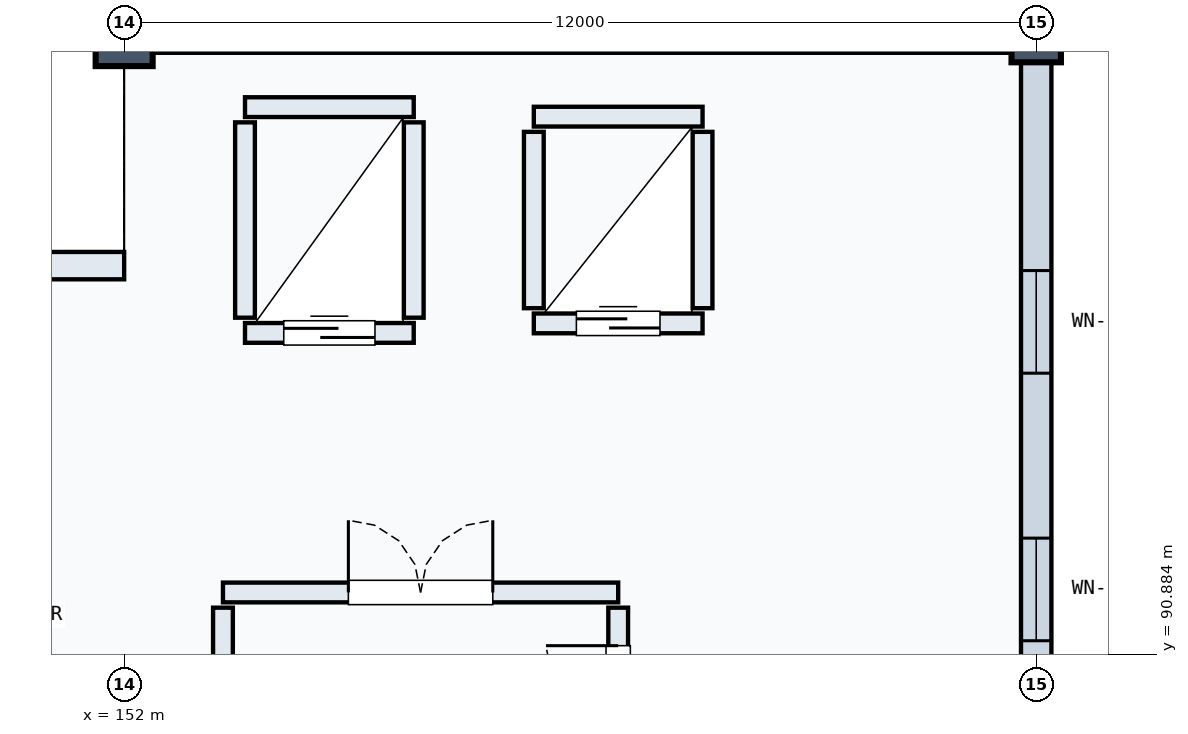
"""IFC4 building model, lengths in metres.
Left out: names, types, materials, properties, quantities, classifications, styles, units other than length and angle.
Written with IfcOpenShell. Run it as: python <this file> out.ifc"""

import sys

from ifc_helpers import new_model, si_unit, direction, frame, frame_2d, origin, origin_2d, place, context, subcontext, project, spatial, rectangle, circle, extrude, element, fill, save


model = new_model("IFC4")
c1 = context("Model", 3, precision=1e-05, world=origin(), true_north=direction((0.0, 1.0)))
c2 = subcontext(c1, "Body", "Model", "MODEL_VIEW")
j1 = project(units=[si_unit("LENGTHUNIT", "METRE"), si_unit("PLANEANGLEUNIT", "RADIAN")], contexts=[c1])
p1 = place(None, origin())
s1 = spatial("IfcSite", under=j1, at=p1, CompositionType="ELEMENT")
p2 = place(p1, origin())
s2 = spatial("IfcBuilding", under=s1, at=p2, CompositionType="ELEMENT")
p3 = place(p2, frame((0.0, 0.0, 19.5)))
s3 = spatial("IfcBuildingStorey", under=s2, at=p3, CompositionType="ELEMENT", Elevation=19.5)
p4 = place(p3, frame((152.0, 99.0, 0.0), z_axis=(0.0, 0.0, 1.0), x_axis=(1.0, 0.0, 0.0)))
e1 = element("IfcColumn", 1, at=p4, inside=s3, PredefinedType="COLUMN", context=c2, shape_type="SweptSolid", body=[
    extrude(circle(Radius=0.375, at=origin_2d()), origin(), (0.0, 0.0, 1.0), 4.8),
])
p5 = place(p3, frame((164.0, 99.0, 0.0), z_axis=(0.0, 0.0, 1.0), x_axis=(1.0, 0.0, 0.0)))
e2 = element("IfcColumn", 2, at=p5, inside=s3, PredefinedType="COLUMN", context=c2, shape_type="SweptSolid", body=[
    extrude(circle(Radius=0.325, at=origin_2d()), origin(), (0.0, 0.0, 1.0), 4.8),
])
p6 = place(p3, frame((140.0, 96.0, 0.0), z_axis=(0.0, 0.0, 1.0), x_axis=(1.0, 0.0, 0.0)))
e3 = element("IfcWall", 3, at=p6, inside=s3, PredefinedType="SOLIDWALL", context=c2, shape_type="SweptSolid", body=[
    extrude(rectangle(XDim=12.0, YDim=0.36, at=frame_2d((6.0, 0.0))), origin(), (0.0, 0.0, 1.0), 3.69),
])
p7 = place(p6, frame((2.1, 0.0, 0.85)))
e4 = element("IfcOpeningElement", 4, at=p7, cuts=e3, PredefinedType="OPENING", context=c2, shape_type="SweptSolid", body=[
    extrude(rectangle(XDim=1.8, YDim=2.1, at=frame_2d((0.9, 1.05))), frame((0.0, 0.19, 0.0), z_axis=(0.0, -1.0, 0.0), x_axis=(1.0, 0.0, 0.0)), (0.0, 0.0, 1.0), 0.38),
])
p8 = place(p6, frame((5.1, 0.0, 0.85)))
e5 = element("IfcOpeningElement", 5, at=p8, cuts=e3, PredefinedType="OPENING", context=c2, shape_type="SweptSolid", body=[
    extrude(rectangle(XDim=1.8, YDim=2.1, at=frame_2d((0.9, 1.05))), frame((0.0, 0.19, 0.0), z_axis=(0.0, -1.0, 0.0), x_axis=(1.0, 0.0, 0.0)), (0.0, 0.0, 1.0), 0.38),
])
p9 = place(p6, frame((8.1, 0.0, 0.85)))
e6 = element("IfcOpeningElement", 6, at=p9, cuts=e3, PredefinedType="OPENING", context=c2, shape_type="SweptSolid", body=[
    extrude(rectangle(XDim=1.8, YDim=2.1, at=frame_2d((0.9, 1.05))), frame((0.0, 0.19, 0.0), z_axis=(0.0, -1.0, 0.0), x_axis=(1.0, 0.0, 0.0)), (0.0, 0.0, 1.0), 0.38),
])
p10 = place(p3, frame((152.22, 99.0, 0.0), z_axis=(0.0, 0.0, 1.0), x_axis=(1.0, 0.0, 0.0)))
e7 = element("IfcWall", 7, at=p10, inside=s3, PredefinedType="SOLIDWALL", context=c2, shape_type="SweptSolid", body=[
    extrude(rectangle(XDim=11.56, YDim=0.4, at=frame_2d((5.78, 0.0))), origin(), (0.0, 0.0, 1.0), 3.69),
])
p11 = place(p10, frame((3.178, 0.0, 0.8)))
e8 = element("IfcOpeningElement", 8, at=p11, cuts=e7, PredefinedType="OPENING", context=c2, shape_type="SweptSolid", body=[
    extrude(rectangle(XDim=1.35, YDim=2.1, at=frame_2d((0.675, 1.05))), frame((0.0, 0.21, 0.0), z_axis=(0.0, -1.0, 0.0), x_axis=(1.0, 0.0, 0.0)), (0.0, 0.0, 1.0), 0.42),
])
p12 = place(p10, frame((7.032, 0.0, 0.8)))
e9 = element("IfcOpeningElement", 9, at=p12, cuts=e7, PredefinedType="OPENING", context=c2, shape_type="SweptSolid", body=[
    extrude(rectangle(XDim=1.35, YDim=2.1, at=frame_2d((0.675, 1.05))), frame((0.0, 0.21, 0.0), z_axis=(0.0, -1.0, 0.0), x_axis=(1.0, 0.0, 0.0)), (0.0, 0.0, 1.0), 0.42),
])
p13 = place(p3, frame((164.0, 88.22, 0.0), z_axis=(0.0, 0.0, 1.0), x_axis=(0.0, 1.0, 0.0)))
e10 = element("IfcWall", 10, at=p13, inside=s3, PredefinedType="SOLIDWALL", context=c2, shape_type="SweptSolid", body=[
    extrude(rectangle(XDim=10.56, YDim=0.4, at=frame_2d((5.28, 0.0))), origin(), (0.0, 0.0, 1.0), 3.79),
])
p14 = place(p13, frame((2.845, 0.0, 0.8)))
e11 = element("IfcOpeningElement", 11, at=p14, cuts=e10, PredefinedType="OPENING", context=c2, shape_type="SweptSolid", body=[
    extrude(rectangle(XDim=1.35, YDim=2.1, at=frame_2d((0.675, 1.05))), frame((0.0, 0.21, 0.0), z_axis=(0.0, -1.0, 0.0), x_axis=(1.0, 0.0, 0.0)), (0.0, 0.0, 1.0), 0.42),
])
p15 = place(p13, frame((6.365, 0.0, 0.8)))
e12 = element("IfcOpeningElement", 12, at=p15, cuts=e10, PredefinedType="OPENING", context=c2, shape_type="SweptSolid", body=[
    extrude(rectangle(XDim=1.35, YDim=2.1, at=frame_2d((0.675, 1.05))), frame((0.0, 0.21, 0.0), z_axis=(0.0, -1.0, 0.0), x_axis=(1.0, 0.0, 0.0)), (0.0, 0.0, 1.0), 0.42),
])
p16 = place(p3, frame((153.59, 95.115, 0.0), z_axis=(0.0, 0.0, 1.0), x_axis=(1.0, 0.0, 0.0)))
e13 = element("IfcWall", 13, at=p16, inside=s3, PredefinedType="SOLIDWALL", context=c2, shape_type="SweptSolid", body=[
    extrude(rectangle(XDim=2.22, YDim=0.26, at=frame_2d((1.11, 0.0))), origin(), (0.0, 0.0, 1.0), 4.46),
])
p17 = place(p16, frame((0.51, 0.0, 0.0)))
e14 = element("IfcOpeningElement", 14, at=p17, cuts=e13, PredefinedType="OPENING", context=c2, shape_type="SweptSolid", body=[
    extrude(rectangle(XDim=1.2, YDim=2.2, at=frame_2d((0.6, 1.1))), frame((0.0, 0.14, 0.0), z_axis=(0.0, -1.0, 0.0), x_axis=(1.0, 0.0, 0.0)), (0.0, 0.0, 1.0), 0.28),
])
p18 = place(p3, frame((153.59, 98.085, 0.0), z_axis=(0.0, 0.0, 1.0), x_axis=(1.0, 0.0, 0.0)))
e15 = element("IfcWall", 15, at=p18, inside=s3, PredefinedType="SOLIDWALL", context=c2, shape_type="SweptSolid", body=[
    extrude(rectangle(XDim=2.22, YDim=0.26, at=frame_2d((1.11, 0.0))), origin(), (0.0, 0.0, 1.0), 4.46),
])
for number, where, z_axis, x_axis in (
    (16, (153.59, 95.315, 0.0), (0.0, 0.0, 1.0), (0.0, 1.0, 0.0)),
    (17, (155.81, 95.315, 0.0), (0.0, 0.0, 1.0), (0.0, 1.0, 0.0)),
):
    element("IfcWall", number, at=place(p3, frame(where, z_axis=z_axis, x_axis=x_axis)), inside=s3, PredefinedType="SOLIDWALL", context=c2, shape_type="SweptSolid", body=[
        extrude(rectangle(XDim=2.57, YDim=0.26, at=frame_2d((1.285, 0.0))), origin(), (0.0, 0.0, 1.0), 4.46),
    ])
p19 = place(p3, frame((157.39, 95.24, 0.0), z_axis=(0.0, 0.0, 1.0), x_axis=(1.0, 0.0, 0.0)))
e18 = element("IfcWall", 18, at=p19, inside=s3, PredefinedType="SOLIDWALL", context=c2, shape_type="SweptSolid", body=[
    extrude(rectangle(XDim=2.22, YDim=0.26, at=frame_2d((1.11, 0.0))), origin(), (0.0, 0.0, 1.0), 4.46),
])
p20 = place(p19, frame((0.56, 0.0, 0.0)))
e19 = element("IfcOpeningElement", 19, at=p20, cuts=e18, PredefinedType="OPENING", context=c2, shape_type="SweptSolid", body=[
    extrude(rectangle(XDim=1.1, YDim=2.15, at=frame_2d((0.55, 1.075))), frame((0.0, 0.14, 0.0), z_axis=(0.0, -1.0, 0.0), x_axis=(1.0, 0.0, 0.0)), (0.0, 0.0, 1.0), 0.28),
])
p21 = place(p3, frame((157.39, 97.96, 0.0), z_axis=(0.0, 0.0, 1.0), x_axis=(1.0, 0.0, 0.0)))
e20 = element("IfcWall", 20, at=p21, inside=s3, PredefinedType="SOLIDWALL", context=c2, shape_type="SweptSolid", body=[
    extrude(rectangle(XDim=2.22, YDim=0.26, at=frame_2d((1.11, 0.0))), origin(), (0.0, 0.0, 1.0), 4.46),
])
for number, where, z_axis, x_axis in (
    (21, (157.39, 95.44, 0.0), (0.0, 0.0, 1.0), (0.0, 1.0, 0.0)),
    (22, (159.61, 95.44, 0.0), (0.0, 0.0, 1.0), (0.0, 1.0, 0.0)),
):
    element("IfcWall", number, at=place(p3, frame(where, z_axis=z_axis, x_axis=x_axis)), inside=s3, PredefinedType="SOLIDWALL", context=c2, shape_type="SweptSolid", body=[
        extrude(rectangle(XDim=2.32, YDim=0.26, at=frame_2d((1.16, 0.0))), origin(), (0.0, 0.0, 1.0), 4.46),
    ])
p22 = place(p3, frame((153.3, 91.7, 0.0), z_axis=(0.0, 0.0, 1.0), x_axis=(1.0, 0.0, 0.0)))
e23 = element("IfcWall", 23, at=p22, inside=s3, PredefinedType="SOLIDWALL", context=c2, shape_type="SweptSolid", body=[
    extrude(rectangle(XDim=5.2, YDim=0.26, at=frame_2d((2.6, 0.0))), origin(), (0.0, 0.0, 1.0), 4.46),
])
p23 = place(p22, frame((1.65, 0.0, 0.0)))
e24 = element("IfcOpeningElement", 24, at=p23, cuts=e23, PredefinedType="OPENING", context=c2, shape_type="SweptSolid", body=[
    extrude(rectangle(XDim=1.9, YDim=2.2, at=frame_2d((0.95, 1.1))), frame((0.0, 0.14, 0.0), z_axis=(0.0, -1.0, 0.0), x_axis=(1.0, 0.0, 0.0)), (0.0, 0.0, 1.0), 0.28),
])
p24 = place(p3, frame((153.3, 88.6, 0.0), z_axis=(0.0, 0.0, 1.0), x_axis=(0.0, 1.0, 0.0)))
e25 = element("IfcWall", 25, at=p24, inside=s3, PredefinedType="SOLIDWALL", context=c2, shape_type="SweptSolid", body=[
    extrude(rectangle(XDim=2.9, YDim=0.26, at=frame_2d((1.45, 0.0))), origin(), (0.0, 0.0, 1.0), 4.46),
])
p25 = place(p3, frame((158.5, 88.6, 0.0), z_axis=(0.0, 0.0, 1.0), x_axis=(0.0, 1.0, 0.0)))
e26 = element("IfcWall", 26, at=p25, inside=s3, PredefinedType="SOLIDWALL", context=c2, shape_type="SweptSolid", body=[
    extrude(rectangle(XDim=2.9, YDim=0.26, at=frame_2d((1.45, 0.0))), origin(), (0.0, 0.0, 1.0), 4.46),
])
p26 = place(p25, frame((0.5, 0.0, 0.0)))
e27 = element("IfcOpeningElement", 27, at=p26, cuts=e26, PredefinedType="OPENING", context=c2, shape_type="SweptSolid", body=[
    extrude(rectangle(XDim=1.9, YDim=2.2, at=frame_2d((0.95, 1.1))), frame((0.0, 0.14, 0.0), z_axis=(0.0, -1.0, 0.0), x_axis=(1.0, 0.0, 0.0)), (0.0, 0.0, 1.0), 0.28),
])
p27 = place(p14, origin())
e28 = element("IfcWindow", 28, at=p27, inside=s3, PartitioningType="SINGLE_PANEL", PredefinedType="WINDOW", context=c2, shape_type="SweptSolid", body=[
    extrude(rectangle(XDim=1.35, YDim=2.1, at=frame_2d((0.675, 1.05))), frame((0.0, 0.03, 0.0), z_axis=(0.0, -1.0, 0.0), x_axis=(1.0, 0.0, 0.0)), (0.0, 0.0, 1.0), 0.06),
])
fill(e11, e28)
p28 = place(p15, origin())
e29 = element("IfcWindow", 29, at=p28, inside=s3, PartitioningType="SINGLE_PANEL", PredefinedType="WINDOW", context=c2, shape_type="SweptSolid", body=[
    extrude(rectangle(XDim=1.35, YDim=2.1, at=frame_2d((0.675, 1.05))), frame((0.0, 0.03, 0.0), z_axis=(0.0, -1.0, 0.0), x_axis=(1.0, 0.0, 0.0)), (0.0, 0.0, 1.0), 0.06),
])
fill(e12, e29)
p29 = place(p17, origin())
e30 = element("IfcDoor", 30, at=p29, inside=s3, OperationType="SLIDING_TO_LEFT", PredefinedType="DOOR", context=c2, shape_type="SweptSolid", body=[
    extrude(rectangle(XDim=1.2, YDim=2.2, at=frame_2d((0.6, 1.1))), frame((0.0, 0.025, 0.0), z_axis=(0.0, -1.0, 0.0), x_axis=(1.0, 0.0, 0.0)), (0.0, 0.0, 1.0), 0.05),
])
fill(e14, e30)
p30 = place(p20, origin())
e31 = element("IfcDoor", 31, at=p30, inside=s3, OperationType="SLIDING_TO_LEFT", PredefinedType="DOOR", context=c2, shape_type="SweptSolid", body=[
    extrude(rectangle(XDim=1.1, YDim=2.15, at=frame_2d((0.55, 1.075))), frame((0.0, 0.025, 0.0), z_axis=(0.0, -1.0, 0.0), x_axis=(1.0, 0.0, 0.0)), (0.0, 0.0, 1.0), 0.05),
])
fill(e19, e31)
p31 = place(p23, origin())
e32 = element("IfcDoor", 32, at=p31, inside=s3, OperationType="DOUBLE_DOOR_SINGLE_SWING", PredefinedType="DOOR", context=c2, shape_type="SweptSolid", body=[
    extrude(rectangle(XDim=1.9, YDim=2.2, at=frame_2d((0.95, 1.1))), frame((0.0, 0.025, 0.0), z_axis=(0.0, -1.0, 0.0), x_axis=(1.0, 0.0, 0.0)), (0.0, 0.0, 1.0), 0.05),
])
fill(e24, e32)
p32 = place(p26, origin())
e33 = element("IfcDoor", 33, at=p32, inside=s3, OperationType="DOUBLE_DOOR_SINGLE_SWING", PredefinedType="DOOR", context=c2, shape_type="SweptSolid", body=[
    extrude(rectangle(XDim=1.9, YDim=2.2, at=frame_2d((0.95, 1.1))), frame((0.0, 0.025, 0.0), z_axis=(0.0, -1.0, 0.0), x_axis=(1.0, 0.0, 0.0)), (0.0, 0.0, 1.0), 0.05),
])
fill(e27, e33)
save(model, sys.argv[1])
